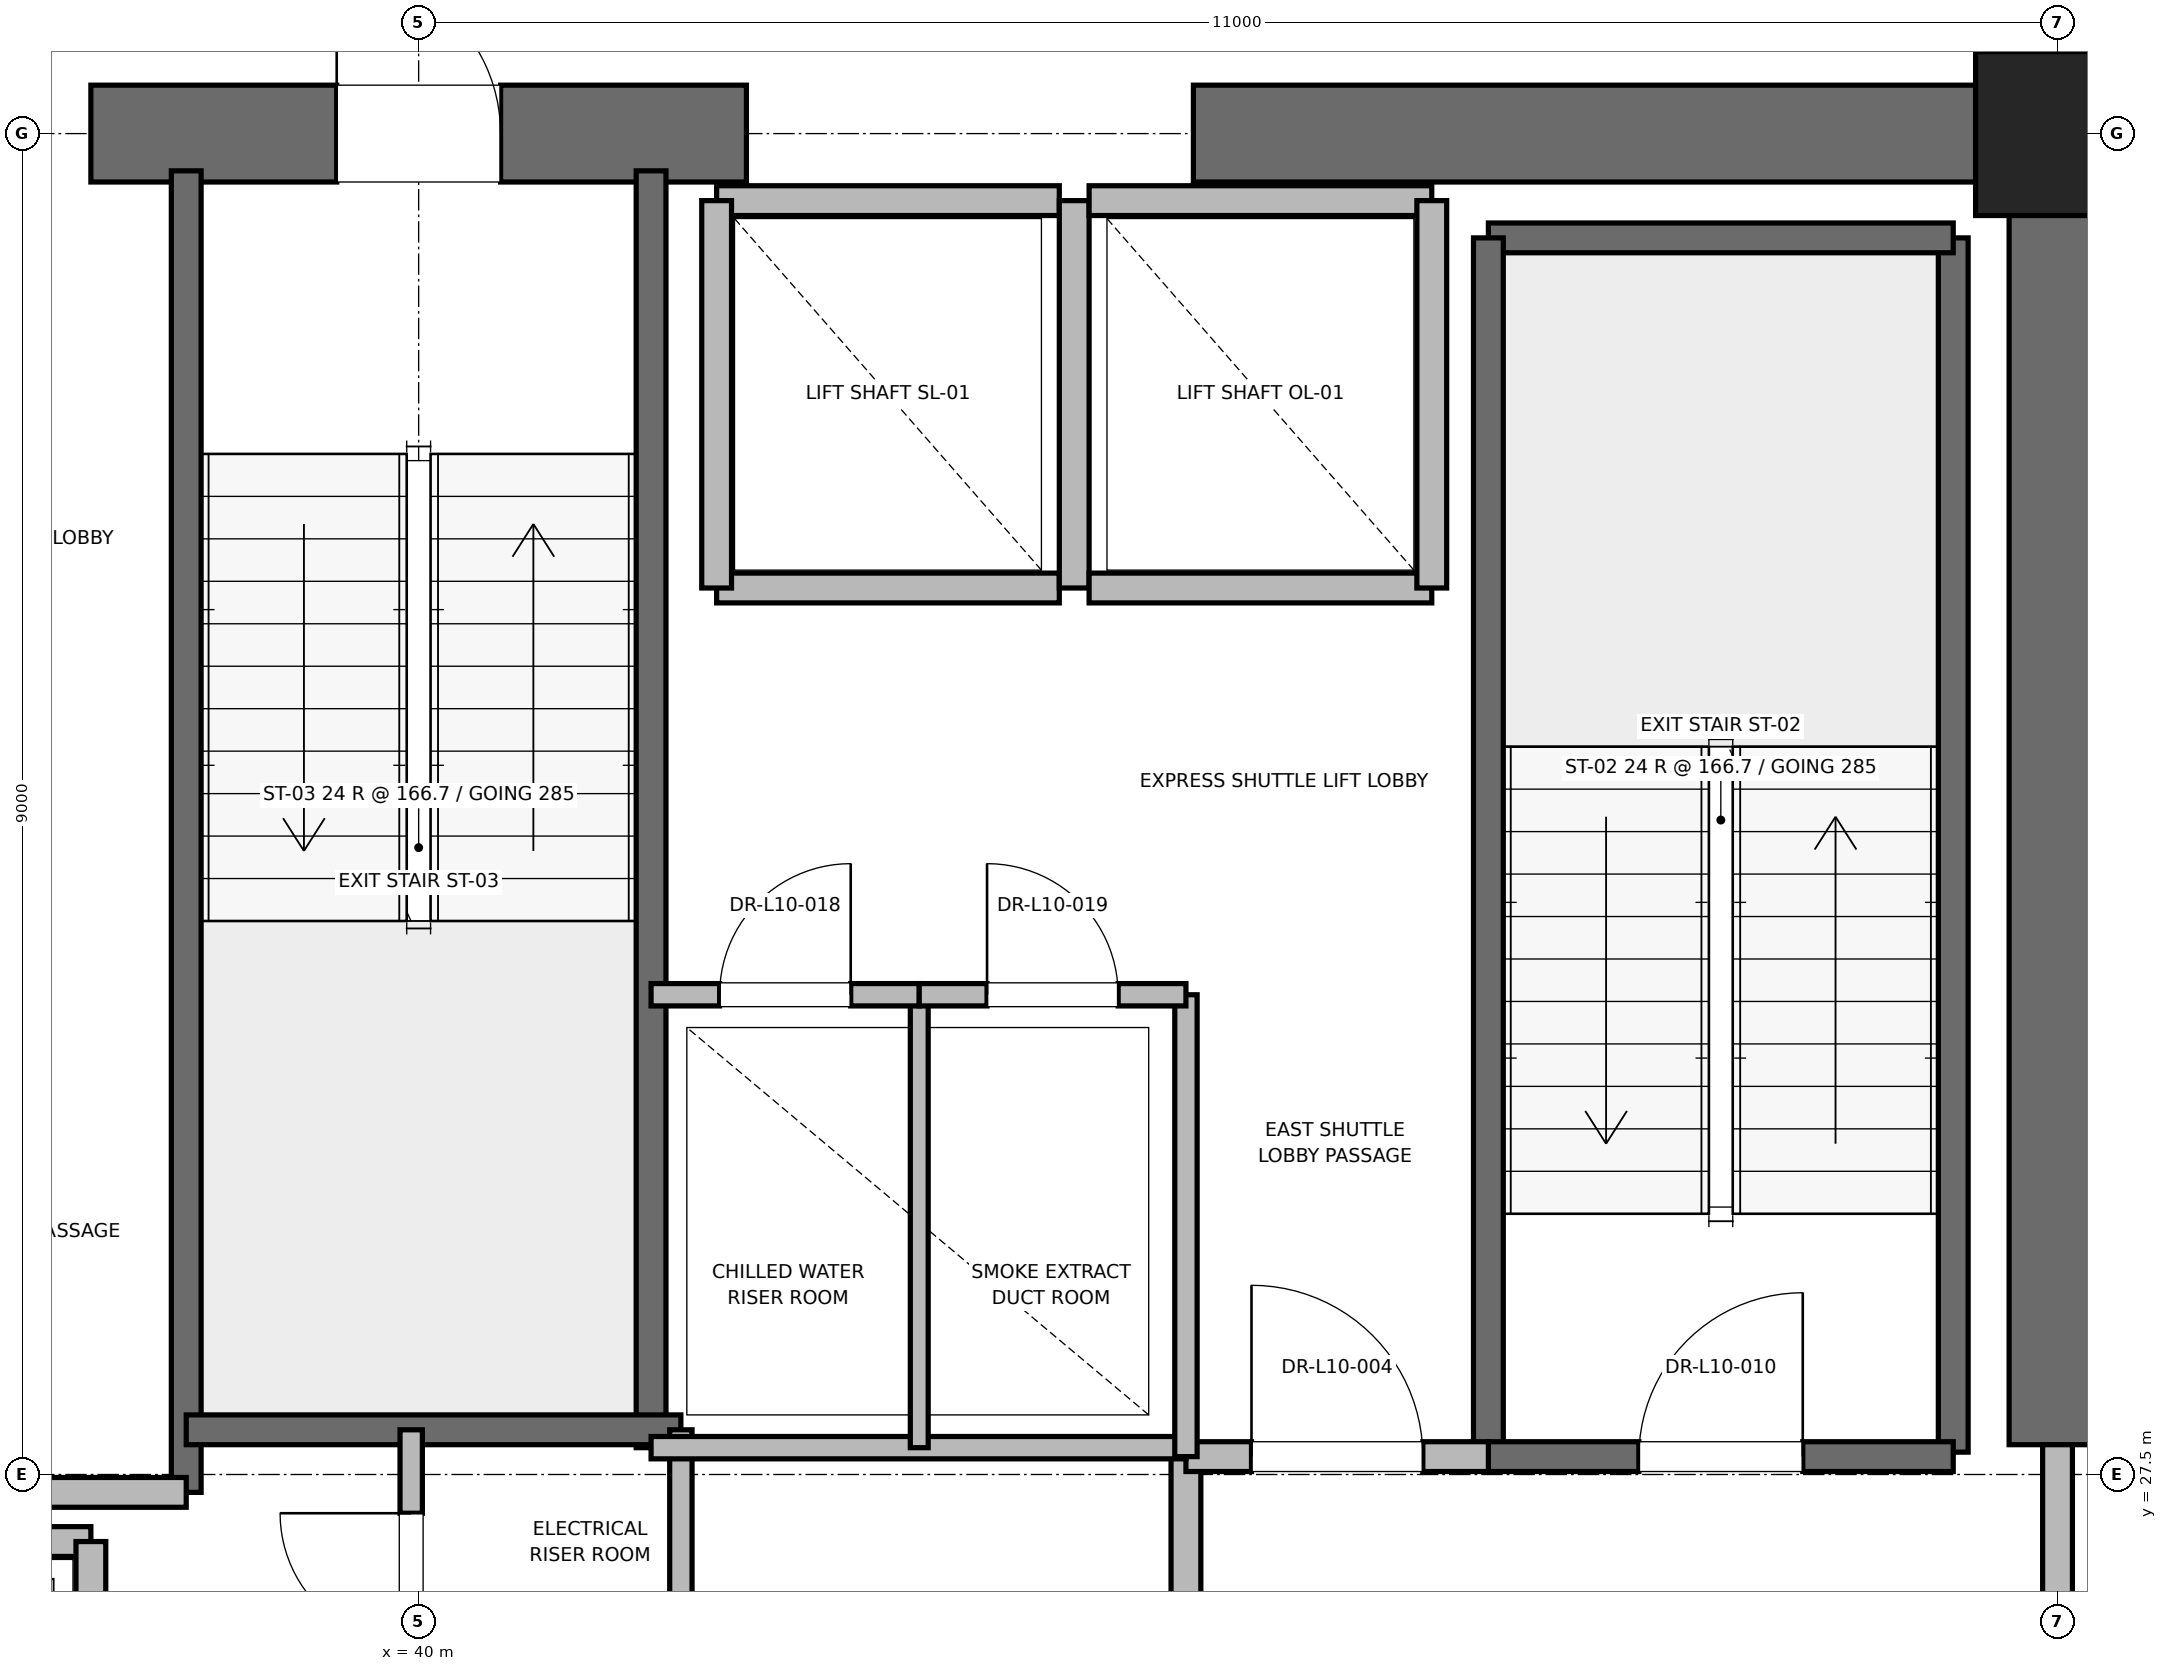
"""IFC4 building model, lengths in metres.
Left out: names, types, materials, properties, quantities, classifications, styles, units other than length and angle.
Written with IfcOpenShell. Run it as: python <this file> out.ifc"""

import sys

from ifc_helpers import new_model, si_unit, direction, frame, frame_2d, origin, origin_2d, place, context, subcontext, project, spatial, rectangle, extrude, element, fill, save


model = new_model("IFC4")
c1 = context("Model", 3, precision=1e-05, world=origin(), true_north=direction((0.0, 1.0)))
c2 = subcontext(c1, "Body", "Model", "MODEL_VIEW")
j1 = project(units=[si_unit("LENGTHUNIT", "METRE"), si_unit("PLANEANGLEUNIT", "RADIAN")], contexts=[c1])
p1 = place(None, origin())
s1 = spatial("IfcSite", under=j1, at=p1, CompositionType="ELEMENT")
p2 = place(p1, origin())
s2 = spatial("IfcBuilding", under=s1, at=p2, CompositionType="ELEMENT")
p3 = place(p2, frame((0.0, 0.0, 47.6)))
s3 = spatial("IfcBuildingStorey", under=s2, at=p3, CompositionType="ELEMENT", Elevation=47.6)
p4 = place(p3, frame((51.0, 36.5, 0.0), z_axis=(0.0, 0.0, 1.0), x_axis=(1.0, 0.0, 0.0)))
e1 = element("IfcColumn", 1, at=p4, inside=s3, PredefinedType="PILASTER", context=c2, shape_type="SweptSolid", body=[
    extrude(rectangle(XDim=1.1, YDim=1.1, at=origin_2d()), origin(), (0.0, 0.0, 1.0), 4.0),
])
p5 = place(p3, frame((37.8, 36.5, 0.0), z_axis=(0.0, 0.0, 1.0), x_axis=(1.0, 0.0, 0.0)))
e2 = element("IfcWall", 2, at=p5, inside=s3, PredefinedType="SHEAR", context=c2, shape_type="SweptSolid", body=[
    extrude(rectangle(XDim=4.4, YDim=0.65, at=frame_2d((2.2, 0.0))), origin(), (0.0, 0.0, 1.0), 3.76),
])
p6 = place(p5, frame((1.65, 0.0, 0.0)))
e3 = element("IfcOpeningElement", 3, at=p6, cuts=e2, PredefinedType="OPENING", context=c2, shape_type="SweptSolid", body=[
    extrude(rectangle(XDim=1.1, YDim=2.15, at=frame_2d((0.55, 1.075))), frame((0.0, 0.325, 0.0), z_axis=(0.0, -1.0, 0.0), x_axis=(1.0, 0.0, 0.0)), (0.0, 0.0, 1.0), 0.65),
])
p7 = place(p3, frame((45.2, 36.5, 0.0), z_axis=(0.0, 0.0, 1.0), x_axis=(1.0, 0.0, 0.0)))
e4 = element("IfcWall", 4, at=p7, inside=s3, PredefinedType="SHEAR", context=c2, shape_type="SweptSolid", body=[
    extrude(rectangle(XDim=5.8, YDim=0.65, at=frame_2d((2.9, 0.0))), origin(), (0.0, 0.0, 1.0), 3.76),
])
p8 = place(p3, frame((51.0, 27.7, 0.0), z_axis=(0.0, 0.0, 1.0), x_axis=(0.0, 1.0, 0.0)))
e5 = element("IfcWall", 5, at=p8, inside=s3, PredefinedType="SHEAR", context=c2, shape_type="SweptSolid", body=[
    extrude(rectangle(XDim=8.8, YDim=0.65, at=frame_2d((4.4, 0.0))), origin(), (0.0, 0.0, 1.0), 3.76),
])
p9 = place(p3, frame((50.3, 27.65, 0.0), z_axis=(0.0, 0.0, 1.0), x_axis=(0.0, 1.0, 0.0)))
e6 = element("IfcWall", 6, at=p9, inside=s3, PredefinedType="SOLIDWALL", context=c2, shape_type="SweptSolid", body=[
    extrude(rectangle(XDim=8.15, YDim=0.2, at=frame_2d((4.075, 0.0))), origin(), (0.0, 0.0, 1.0), 3.76),
])
p10 = place(p3, frame((47.18, 35.8, 0.0), z_axis=(0.0, 0.0, 1.0), x_axis=(1.0, 0.0, 0.0)))
e7 = element("IfcWall", 7, at=p10, inside=s3, PredefinedType="SOLIDWALL", context=c2, shape_type="SweptSolid", body=[
    extrude(rectangle(XDim=3.12, YDim=0.2, at=frame_2d((1.56, 0.0))), origin(), (0.0, 0.0, 1.0), 3.76),
])
p11 = place(p3, frame((47.18, 27.62, 0.0), z_axis=(0.0, 0.0, 1.0), x_axis=(0.0, 1.0, 0.0)))
e8 = element("IfcWall", 8, at=p11, inside=s3, PredefinedType="SOLIDWALL", context=c2, shape_type="SweptSolid", body=[
    extrude(rectangle(XDim=8.18, YDim=0.2, at=frame_2d((4.09, 0.0))), origin(), (0.0, 0.0, 1.0), 3.76),
])
p12 = place(p3, frame((47.18, 27.62, 0.0), z_axis=(0.0, 0.0, 1.0), x_axis=(1.0, 0.0, 0.0)))
e9 = element("IfcWall", 9, at=p12, inside=s3, PredefinedType="SOLIDWALL", context=c2, shape_type="SweptSolid", body=[
    extrude(rectangle(XDim=3.12, YDim=0.2, at=frame_2d((1.56, 0.0))), origin(), (0.0, 0.0, 1.0), 3.76),
])
p13 = place(p12, frame((1.01, 0.0, 0.0)))
e10 = element("IfcOpeningElement", 10, at=p13, cuts=e9, PredefinedType="OPENING", context=c2, shape_type="SweptSolid", body=[
    extrude(rectangle(XDim=1.1, YDim=2.15, at=frame_2d((0.55, 1.075))), frame((0.0, 0.1, 0.0), z_axis=(0.0, -1.0, 0.0), x_axis=(1.0, 0.0, 0.0)), (0.0, 0.0, 1.0), 0.2),
])
p14 = place(p3, frame((38.44, 27.38, 0.0), z_axis=(0.0, 0.0, 1.0), x_axis=(0.0, 1.0, 0.0)))
e11 = element("IfcWall", 11, at=p14, inside=s3, PredefinedType="SOLIDWALL", context=c2, shape_type="SweptSolid", body=[
    extrude(rectangle(XDim=8.87, YDim=0.2, at=frame_2d((4.435, 0.0))), origin(), (0.0, 0.0, 1.0), 3.76),
])
p15 = place(p3, frame((41.56, 27.68, 0.0), z_axis=(0.0, 0.0, 1.0), x_axis=(0.0, 1.0, 0.0)))
e12 = element("IfcWall", 12, at=p15, inside=s3, PredefinedType="SOLIDWALL", context=c2, shape_type="SweptSolid", body=[
    extrude(rectangle(XDim=8.57, YDim=0.2, at=frame_2d((4.285, 0.0))), origin(), (0.0, 0.0, 1.0), 3.76),
])
p16 = place(p3, frame((38.44, 27.8, 0.0), z_axis=(0.0, 0.0, 1.0), x_axis=(1.0, 0.0, 0.0)))
e13 = element("IfcWall", 13, at=p16, inside=s3, PredefinedType="SOLIDWALL", context=c2, shape_type="SweptSolid", body=[
    extrude(rectangle(XDim=3.32, YDim=0.2, at=frame_2d((1.66, 0.0))), origin(), (0.0, 0.0, 1.0), 3.76),
])
p17 = place(p3, frame((32.82, 27.38, 0.0), z_axis=(0.0, 0.0, 1.0), x_axis=(1.0, 0.0, 0.0)))
e14 = element("IfcWall", 14, at=p17, inside=s3, PredefinedType="PARTITIONING", context=c2, shape_type="SweptSolid", body=[
    extrude(rectangle(XDim=5.62, YDim=0.2, at=frame_2d((2.81, 0.0))), origin(), (0.0, 0.0, 1.0), 3.76),
])
p18 = place(p3, frame((45.15, 24.25, 0.0), z_axis=(0.0, 0.0, 1.0), x_axis=(0.0, 1.0, 0.0)))
e15 = element("IfcWall", 15, at=p18, inside=s3, PredefinedType="PARTITIONING", context=c2, shape_type="SweptSolid", body=[
    extrude(rectangle(XDim=3.37, YDim=0.2, at=frame_2d((1.685, 0.0))), origin(), (0.0, 0.0, 1.0), 3.76),
])
p19 = place(p3, frame((45.15, 27.62, 0.0), z_axis=(0.0, 0.0, 1.0), x_axis=(1.0, 0.0, 0.0)))
e16 = element("IfcWall", 16, at=p19, inside=s3, PredefinedType="PARTITIONING", context=c2, shape_type="SweptSolid", body=[
    extrude(rectangle(XDim=2.03, YDim=0.2, at=frame_2d((1.015, 0.0))), origin(), (0.0, 0.0, 1.0), 3.76),
])
p20 = place(p19, frame((0.44, 0.0, 0.0)))
e17 = element("IfcOpeningElement", 17, at=p20, cuts=e16, PredefinedType="OPENING", context=c2, shape_type="SweptSolid", body=[
    extrude(rectangle(XDim=1.15, YDim=2.2, at=frame_2d((0.575, 1.1))), frame((0.0, 0.1, 0.0), z_axis=(0.0, -1.0, 0.0), x_axis=(1.0, 0.0, 0.0)), (0.0, 0.0, 1.0), 0.2),
])
p21 = place(p3, frame((51.0, 24.3, 0.0), z_axis=(0.0, 0.0, 1.0), x_axis=(0.0, 1.0, 0.0)))
e18 = element("IfcWall", 18, at=p21, inside=s3, PredefinedType="PARTITIONING", context=c2, shape_type="SweptSolid", body=[
    extrude(rectangle(XDim=3.4, YDim=0.2, at=frame_2d((1.7, 0.0))), origin(), (0.0, 0.0, 1.0), 2.54),
])
p22 = place(p21, frame((1.125, 0.0, 0.0)))
e19 = element("IfcOpeningElement", 19, at=p22, cuts=e18, PredefinedType="OPENING", context=c2, shape_type="SweptSolid", body=[
    extrude(rectangle(XDim=1.15, YDim=2.2, at=frame_2d((0.575, 1.1))), frame((0.0, 0.1, 0.0), z_axis=(0.0, -1.0, 0.0), x_axis=(1.0, 0.0, 0.0)), (0.0, 0.0, 1.0), 0.2),
])
p23 = place(p3, frame((37.8, 27.05, 0.0), z_axis=(0.0, 0.0, 1.0), x_axis=(-1.0, 0.0, 0.0)))
e20 = element("IfcWall", 20, at=p23, inside=s3, PredefinedType="SOLIDWALL", context=c2, shape_type="SweptSolid", body=[
    extrude(rectangle(XDim=2.3, YDim=0.2, at=frame_2d((1.15, 0.0))), origin(), (0.0, 0.0, 1.0), 3.76),
])
p24 = place(p3, frame((37.8, 24.45, 0.0), z_axis=(0.0, 0.0, 1.0), x_axis=(0.0, 1.0, 0.0)))
e21 = element("IfcWall", 21, at=p24, inside=s3, PredefinedType="SOLIDWALL", context=c2, shape_type="SweptSolid", body=[
    extrude(rectangle(XDim=2.6, YDim=0.2, at=frame_2d((1.3, 0.0))), origin(), (0.0, 0.0, 1.0), 3.76),
])
p25 = place(p3, frame((42.0, 33.45, 0.0), z_axis=(0.0, 0.0, 1.0), x_axis=(1.0, 0.0, 0.0)))
e22 = element("IfcWall", 22, at=p25, inside=s3, PredefinedType="SOLIDWALL", context=c2, shape_type="SweptSolid", body=[
    extrude(rectangle(XDim=2.3, YDim=0.2, at=frame_2d((1.15, 0.0))), origin(), (0.0, 0.0, 1.0), 3.76),
])
p26 = place(p3, frame((44.3, 36.05, 0.0), z_axis=(0.0, 0.0, 1.0), x_axis=(-1.0, 0.0, 0.0)))
e23 = element("IfcWall", 23, at=p26, inside=s3, PredefinedType="SOLIDWALL", context=c2, shape_type="SweptSolid", body=[
    extrude(rectangle(XDim=2.3, YDim=0.2, at=frame_2d((1.15, 0.0))), origin(), (0.0, 0.0, 1.0), 2.54),
])
for number, where, z_axis, x_axis in (
    (24, (42.0, 36.05, 0.0), (0.0, 0.0, 1.0), (0.0, -1.0, 0.0)),
    (25, (44.4, 33.45, 0.0), (0.0, 0.0, 1.0), (0.0, 1.0, 0.0)),
):
    element("IfcWall", number, at=place(p3, frame(where, z_axis=z_axis, x_axis=x_axis)), inside=s3, PredefinedType="SOLIDWALL", context=c2, shape_type="SweptSolid", body=[
        extrude(rectangle(XDim=2.6, YDim=0.2, at=frame_2d((1.3, 0.0))), origin(), (0.0, 0.0, 1.0), 2.54),
    ])
p27 = place(p3, frame((44.5, 33.45, 0.0), z_axis=(0.0, 0.0, 1.0), x_axis=(1.0, 0.0, 0.0)))
e26 = element("IfcWall", 26, at=p27, inside=s3, PredefinedType="SOLIDWALL", context=c2, shape_type="SweptSolid", body=[
    extrude(rectangle(XDim=2.3, YDim=0.2, at=frame_2d((1.15, 0.0))), origin(), (0.0, 0.0, 1.0), 3.76),
])
p28 = place(p3, frame((46.8, 36.05, 0.0), z_axis=(0.0, 0.0, 1.0), x_axis=(-1.0, 0.0, 0.0)))
e27 = element("IfcWall", 27, at=p28, inside=s3, PredefinedType="SOLIDWALL", context=c2, shape_type="SweptSolid", body=[
    extrude(rectangle(XDim=2.3, YDim=0.2, at=frame_2d((1.15, 0.0))), origin(), (0.0, 0.0, 1.0), 2.54),
])
p29 = place(p3, frame((46.8, 33.45, 0.0), z_axis=(0.0, 0.0, 1.0), x_axis=(0.0, 1.0, 0.0)))
e28 = element("IfcWall", 28, at=p29, inside=s3, PredefinedType="SOLIDWALL", context=c2, shape_type="SweptSolid", body=[
    extrude(rectangle(XDim=2.6, YDim=0.2, at=frame_2d((1.3, 0.0))), origin(), (0.0, 0.0, 1.0), 3.76),
])
p30 = place(p3, frame((41.76, 23.8, 0.0), z_axis=(0.0, 0.0, 1.0), x_axis=(0.0, 1.0, 0.0)))
e29 = element("IfcWall", 29, at=p30, inside=s3, PredefinedType="PARTITIONING", context=c2, shape_type="SweptSolid", body=[
    extrude(rectangle(XDim=4.0, YDim=0.15, at=frame_2d((2.0, 0.0))), origin(), (0.0, 0.0, 1.0), 2.85),
])
p31 = place(p3, frame((39.95, 25.8, 0.0), z_axis=(0.0, 0.0, 1.0), x_axis=(0.0, 1.0, 0.0)))
e30 = element("IfcWall", 30, at=p31, inside=s3, PredefinedType="PARTITIONING", context=c2, shape_type="SweptSolid", body=[
    extrude(rectangle(XDim=2.0, YDim=0.15, at=frame_2d((1.0, 0.0))), origin(), (0.0, 0.0, 1.0), 2.85),
])
p32 = place(p31, frame((0.56, 0.0, 0.0)))
e31 = element("IfcOpeningElement", 31, at=p32, cuts=e30, PredefinedType="OPENING", context=c2, shape_type="SweptSolid", body=[
    extrude(rectangle(XDim=0.88, YDim=2.1, at=frame_2d((0.44, 1.05))), frame((0.0, 0.075, 0.0), z_axis=(0.0, -1.0, 0.0), x_axis=(1.0, 0.0, 0.0)), (0.0, 0.0, 1.0), 0.15),
])
p33 = place(p3, frame((41.56, 27.68, 0.0), z_axis=(0.0, 0.0, 1.0), x_axis=(1.0, 0.0, 0.0)))
e32 = element("IfcWall", 32, at=p33, inside=s3, PredefinedType="PARTITIONING", context=c2, shape_type="SweptSolid", body=[
    extrude(rectangle(XDim=3.59, YDim=0.15, at=frame_2d((1.795, 0.0))), origin(), (0.0, 0.0, 1.0), 2.85),
])
p34 = place(p3, frame((45.15, 27.62, 0.0), z_axis=(0.0, 0.0, 1.0), x_axis=(0.0, 1.0, 0.0)))
e33 = element("IfcWall", 33, at=p34, inside=s3, PredefinedType="PARTITIONING", context=c2, shape_type="SweptSolid", body=[
    extrude(rectangle(XDim=3.1, YDim=0.15, at=frame_2d((1.55, 0.0))), origin(), (0.0, 0.0, 1.0), 2.85),
])
p35 = place(p3, frame((43.36, 27.68, 0.0), z_axis=(0.0, 0.0, 1.0), x_axis=(0.0, 1.0, 0.0)))
e34 = element("IfcWall", 34, at=p35, inside=s3, PredefinedType="PARTITIONING", context=c2, shape_type="SweptSolid", body=[
    extrude(rectangle(XDim=3.04, YDim=0.12, at=frame_2d((1.52, 0.0))), origin(), (0.0, 0.0, 1.0), 2.85),
])
p36 = place(p3, frame((41.56, 30.72, 0.0), z_axis=(0.0, 0.0, 1.0), x_axis=(1.0, 0.0, 0.0)))
e35 = element("IfcWall", 35, at=p36, inside=s3, PredefinedType="PARTITIONING", context=c2, shape_type="SweptSolid", body=[
    extrude(rectangle(XDim=1.8, YDim=0.15, at=frame_2d((0.9, 0.0))), origin(), (0.0, 0.0, 1.0), 2.85),
])
p37 = place(p36, frame((0.46, 0.0, 0.0)))
e36 = element("IfcOpeningElement", 36, at=p37, cuts=e35, PredefinedType="OPENING", context=c2, shape_type="SweptSolid", body=[
    extrude(rectangle(XDim=0.88, YDim=2.1, at=frame_2d((0.44, 1.05))), frame((0.0, 0.075, 0.0), z_axis=(0.0, -1.0, 0.0), x_axis=(1.0, 0.0, 0.0)), (0.0, 0.0, 1.0), 0.15),
])
p38 = place(p3, frame((43.36, 30.72, 0.0), z_axis=(0.0, 0.0, 1.0), x_axis=(1.0, 0.0, 0.0)))
e37 = element("IfcWall", 37, at=p38, inside=s3, PredefinedType="PARTITIONING", context=c2, shape_type="SweptSolid", body=[
    extrude(rectangle(XDim=1.79, YDim=0.15, at=frame_2d((0.895, 0.0))), origin(), (0.0, 0.0, 1.0), 2.85),
])
p39 = place(p38, frame((0.455, 0.0, 0.0)))
e38 = element("IfcOpeningElement", 38, at=p39, cuts=e37, PredefinedType="OPENING", context=c2, shape_type="SweptSolid", body=[
    extrude(rectangle(XDim=0.88, YDim=2.1, at=frame_2d((0.44, 1.05))), frame((0.0, 0.075, 0.0), z_axis=(0.0, -1.0, 0.0), x_axis=(1.0, 0.0, 0.0)), (0.0, 0.0, 1.0), 0.15),
])
p40 = place(p13, origin())
e39 = element("IfcDoor", 39, at=p40, inside=s3, OperationType="SINGLE_SWING_RIGHT", PredefinedType="DOOR", context=c2, shape_type="SweptSolid", body=[
    extrude(rectangle(XDim=1.1, YDim=2.15, at=frame_2d((0.55, 1.075))), frame((0.0, 0.025, 0.0), z_axis=(0.0, -1.0, 0.0), x_axis=(1.0, 0.0, 0.0)), (0.0, 0.0, 1.0), 0.05),
])
fill(e10, e39)
p41 = place(p6, origin())
e40 = element("IfcDoor", 40, at=p41, inside=s3, OperationType="SINGLE_SWING_LEFT", PredefinedType="DOOR", context=c2, shape_type="SweptSolid", body=[
    extrude(rectangle(XDim=1.1, YDim=2.15, at=frame_2d((0.55, 1.075))), frame((0.0, 0.025, 0.0), z_axis=(0.0, -1.0, 0.0), x_axis=(1.0, 0.0, 0.0)), (0.0, 0.0, 1.0), 0.05),
])
fill(e3, e40)
p42 = place(p20, origin())
e41 = element("IfcDoor", 41, at=p42, inside=s3, OperationType="SINGLE_SWING_LEFT", PredefinedType="DOOR", context=c2, shape_type="SweptSolid", body=[
    extrude(rectangle(XDim=1.15, YDim=2.2, at=frame_2d((0.575, 1.1))), frame((0.0, 0.025, 0.0), z_axis=(0.0, -1.0, 0.0), x_axis=(1.0, 0.0, 0.0)), (0.0, 0.0, 1.0), 0.05),
])
fill(e17, e41)
p43 = place(p32, origin())
e42 = element("IfcDoor", 42, at=p43, inside=s3, OperationType="SINGLE_SWING_RIGHT", PredefinedType="DOOR", context=c2, shape_type="SweptSolid", body=[
    extrude(rectangle(XDim=0.88, YDim=2.1, at=frame_2d((0.44, 1.05))), frame((0.0, 0.025, 0.0), z_axis=(0.0, -1.0, 0.0), x_axis=(1.0, 0.0, 0.0)), (0.0, 0.0, 1.0), 0.05),
])
fill(e31, e42)
p44 = place(p37, origin())
e43 = element("IfcDoor", 43, at=p44, inside=s3, OperationType="SINGLE_SWING_RIGHT", PredefinedType="DOOR", context=c2, shape_type="SweptSolid", body=[
    extrude(rectangle(XDim=0.88, YDim=2.1, at=frame_2d((0.44, 1.05))), frame((0.0, 0.025, 0.0), z_axis=(0.0, -1.0, 0.0), x_axis=(1.0, 0.0, 0.0)), (0.0, 0.0, 1.0), 0.05),
])
fill(e36, e43)
p45 = place(p39, origin())
e44 = element("IfcDoor", 44, at=p45, inside=s3, OperationType="SINGLE_SWING_LEFT", PredefinedType="DOOR", context=c2, shape_type="SweptSolid", body=[
    extrude(rectangle(XDim=0.88, YDim=2.1, at=frame_2d((0.44, 1.05))), frame((0.0, 0.025, 0.0), z_axis=(0.0, -1.0, 0.0), x_axis=(1.0, 0.0, 0.0)), (0.0, 0.0, 1.0), 0.05),
])
fill(e38, e44)
save(model, sys.argv[1])
